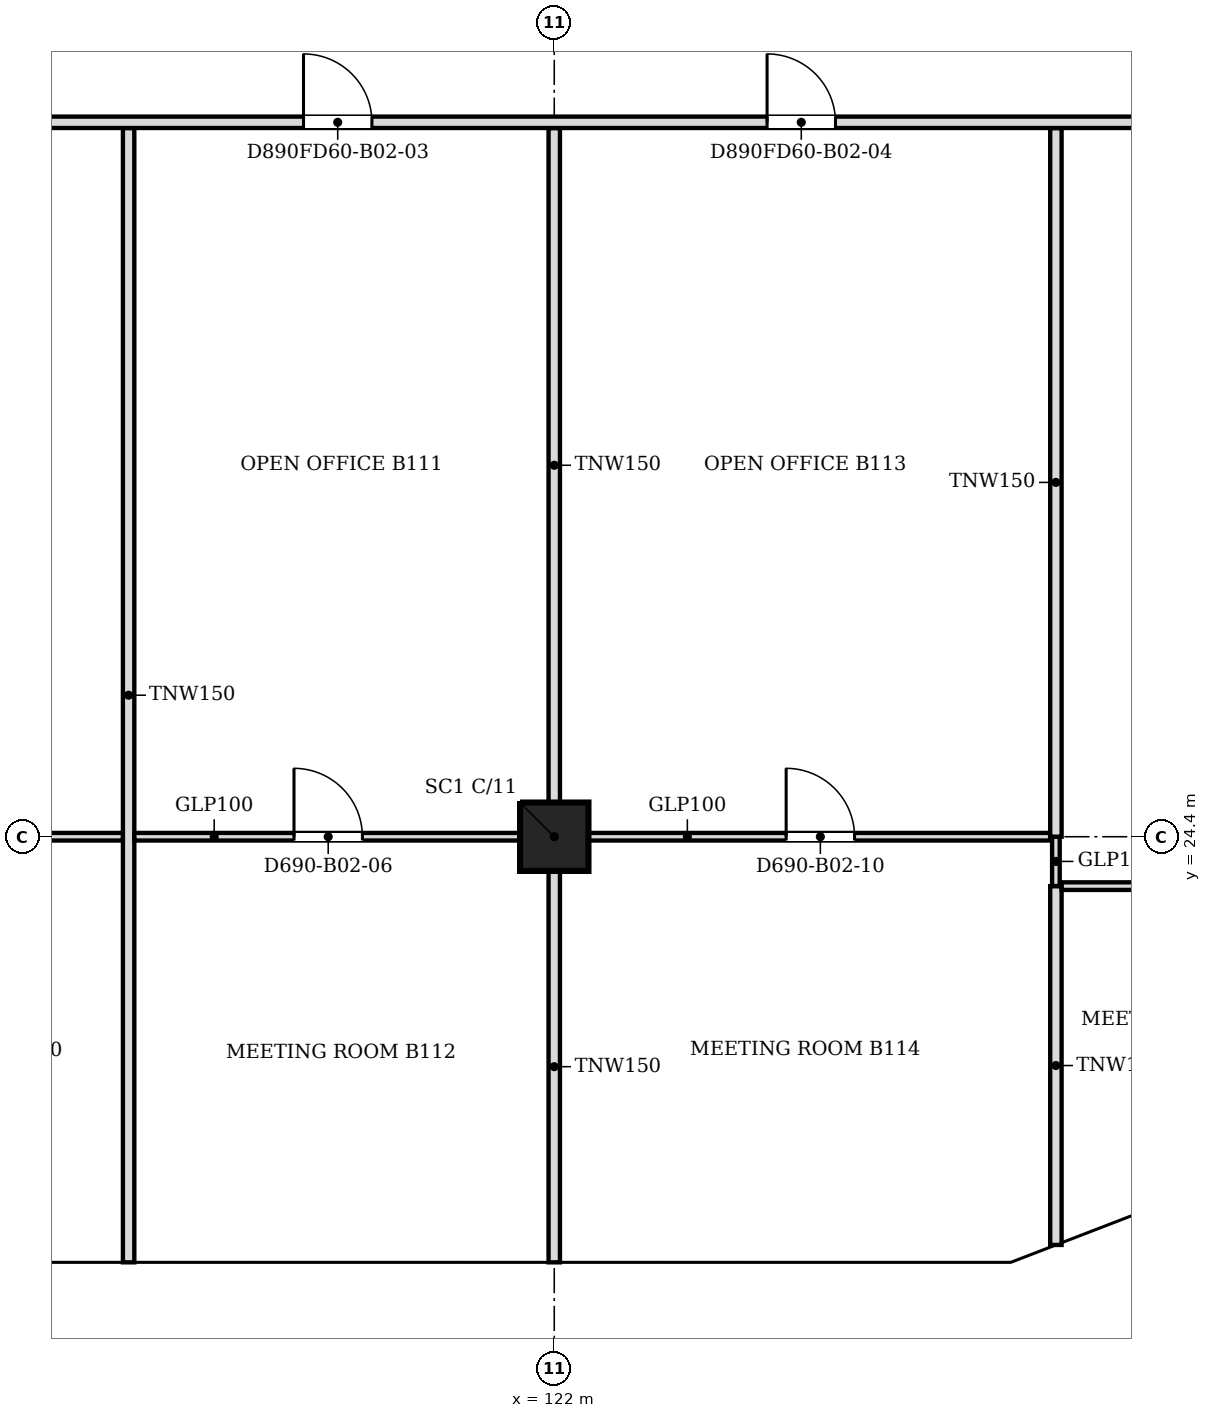
"""IFC4 building model, lengths in metres.
Left out: names, types, materials, properties, quantities, classifications, styles, units other than length and angle.
Written with IfcOpenShell. Run it as: python <this file> out.ifc"""

import sys

from ifc_helpers import new_model, si_unit, direction, frame, frame_2d, origin, origin_2d, place, context, subcontext, project, spatial, polyline, rectangle, outline, extrude, faceted_brep, source, transform, mapped, element, fill, save


model = new_model("IFC4")
c1 = context("Model", 3, precision=1e-05, world=origin(), true_north=direction((0.0, 1.0)))
c2 = subcontext(c1, "Body", "Model", "MODEL_VIEW")
j1 = project(units=[si_unit("LENGTHUNIT", "METRE"), si_unit("PLANEANGLEUNIT", "RADIAN")], contexts=[c1])
p1 = place(None, origin())
s1 = spatial("IfcSite", under=j1, at=p1, CompositionType="ELEMENT")
p2 = place(p1, origin())
s2 = spatial("IfcBuilding", under=s1, at=p2, CompositionType="ELEMENT")
p3 = place(p2, frame((0.0, 0.0, 21.3)))
s3 = spatial("IfcBuildingStorey", under=s2, at=p3, CompositionType="ELEMENT", Elevation=21.3)
p4 = place(p3, frame((122.0, 24.4, 0.0), z_axis=(0.0, 0.0, 1.0), x_axis=(1.0, 0.0, 0.0)))
e1 = element("IfcColumn", 1, at=p4, inside=s3, PredefinedType="COLUMN", context=c2, shape_type="SweptSolid", body=[
    extrude(rectangle(XDim=0.9, YDim=0.9, at=origin_2d()), origin(), (0.0, 0.0, 1.0), 4.3),
])
m1 = source(origin(), c2, "Body", "Brep", [
    faceted_brep([(3.05, -0.25, 0.0), (6.1, -0.25, 4.5), (6.1, -0.25, 4.5), (3.05, -0.25, 9.0), (0.0, -0.25, 4.5), (0.0, 0.25, 4.5), (3.05, 0.25, 9.0), (6.1, 0.25, 4.5), (6.1, 0.25, 4.5), (3.05, 0.25, 0.0)], [[[0, 1, 2, 3, 4]], [[5, 6, 7, 8, 9]], [[9, 8, 1, 0]], [[7, 6, 3, 2]], [[6, 5, 4, 3]], [[5, 9, 0, 4]], [[1, 8, 7, 2]]]),
])
p5 = place(p3, frame((109.8, 18.55, -4.5), z_axis=(0.0, 0.0, 1.0), x_axis=(1.0, 0.0, 0.0)))
e2 = element("IfcWall", 2, at=p5, inside=s3, PredefinedType="SOLIDWALL", context=c2, shape_type="MappedRepresentation", body=[
    mapped(m1, transform((0.0, 0.0, 0.0), scale=1.0)),
])
m2 = source(origin(), c2, "Body", "SweptSolid", [
    extrude(outline(polyline([(3.05, 0.446), (5.798, 4.5), (3.05, 8.554), (0.302, 4.5), (3.05, 0.446)])), frame((0.0, 0.26, 0.0), z_axis=(0.0, -1.0, 0.0), x_axis=(1.0, 0.0, 0.0)), (0.0, 0.0, 1.0), 0.52),
])
p6 = place(p5, origin())
e3 = element("IfcOpeningElement", 3, at=p6, cuts=e2, PredefinedType="OPENING", context=c2, shape_type="MappedRepresentation", body=[
    mapped(m2, transform((0.0, 0.0, 0.0), scale=1.0)),
])
m3 = source(origin(), c2, "Body", "SweptSolid", [
    extrude(outline(polyline([(3.05, 0.0), (6.1, 4.5), (3.05, 9.0), (0.0, 4.5), (3.05, 0.0)])), frame((0.0, 0.25, 0.0), z_axis=(0.0, -1.0, 0.0), x_axis=(1.0, 0.0, 0.0)), (0.0, 0.0, 1.0), 0.5),
])
p7 = place(p3, frame((115.9, 18.55, -4.5), z_axis=(0.0, 0.0, 1.0), x_axis=(1.0, 0.0, 0.0)))
e4 = element("IfcWall", 4, at=p7, inside=s3, PredefinedType="SOLIDWALL", context=c2, shape_type="MappedRepresentation", body=[
    mapped(m3, transform((0.0, 0.0, 0.0), scale=1.0)),
])
p8 = place(p7, origin())
e5 = element("IfcOpeningElement", 5, at=p8, cuts=e4, PredefinedType="OPENING", context=c2, shape_type="MappedRepresentation", body=[
    mapped(m2, transform((0.0, 0.0, 0.0), scale=1.0)),
])
m4 = source(origin(), c2, "Body", "Brep", [
    faceted_brep([(3.05, -0.25, 0.0), (6.053, -0.25, 4.5), (3.05, -0.25, 9.0), (0.0, -0.25, 4.5), (0.0, 0.25, 4.5), (3.05, 0.25, 9.0), (6.007, 0.25, 4.57), (6.007, 0.25, 4.43), (3.05, 0.25, 0.0), (6.053, 0.0, 4.5)], [[[0, 1, 2, 3]], [[4, 5, 6, 7, 8]], [[8, 7, 9, 1, 0]], [[6, 5, 2, 1, 9]], [[5, 4, 3, 2]], [[4, 8, 0, 3]], [[9, 7, 6]]]),
])
p9 = place(p3, frame((122.0, 18.55, -4.5), z_axis=(0.0, 0.0, 1.0), x_axis=(1.0, 0.0, 0.0)))
e6 = element("IfcWall", 6, at=p9, inside=s3, PredefinedType="SOLIDWALL", context=c2, shape_type="MappedRepresentation", body=[
    mapped(m4, transform((0.0, 0.0, 0.0), scale=1.0)),
])
m5 = source(origin(), c2, "Body", "SweptSolid", [
    extrude(outline(polyline([(3.048, 0.448), (5.753, 4.5), (3.048, 8.552), (0.302, 4.5), (3.048, 0.448)])), frame((0.0, 0.26, 0.0), z_axis=(0.0, -1.0, 0.0), x_axis=(1.0, 0.0, 0.0)), (0.0, 0.0, 1.0), 0.52),
])
p10 = place(p9, origin())
e7 = element("IfcOpeningElement", 7, at=p10, cuts=e6, PredefinedType="OPENING", context=c2, shape_type="MappedRepresentation", body=[
    mapped(m5, transform((0.0, 0.0, 0.0), scale=1.0)),
])
m6 = source(origin(), c2, "Body", "Brep", [
    faceted_brep([(2.95, -0.25, 0.0), (3.003, -0.25, 0.081), (3.003, -0.25, 8.919), (2.95, -0.25, 9.0), (0.0, -0.25, 4.5), (0.047, 0.25, 4.571), (2.898, 0.25, 8.919), (2.898, 0.25, 0.081), (0.047, 0.25, 4.429), (2.95, 0.0, 0.0), (2.95, 0.0, 9.0), (0.0, 0.0, 4.5)], [[[0, 1, 2, 3, 4]], [[5, 6, 7, 8]], [[1, 0, 9]], [[10, 3, 2]], [[6, 5, 11, 4, 3, 10]], [[8, 7, 9, 0, 4, 11]], [[8, 11, 5]], [[1, 9, 7, 6, 10, 2]]]),
])
p11 = place(p3, frame((128.053, 18.55, -4.5), z_axis=(0.0, 0.0, 1.0), x_axis=(0.933007896601, 0.359855894603, 0.0)))
e8 = element("IfcWall", 8, at=p11, inside=s3, PredefinedType="SOLIDWALL", context=c2, shape_type="MappedRepresentation", body=[
    mapped(m6, transform((0.0, 0.0, 0.0), scale=1.0)),
])
m7 = source(origin(), c2, "Body", "SweptSolid", [
    extrude(outline(polyline([(2.75, 8.239), (0.299, 4.5), (2.75, 0.761), (2.75, 8.239)])), frame((0.0, 0.26, 0.0), z_axis=(0.0, -1.0, 0.0), x_axis=(1.0, 0.0, 0.0)), (0.0, 0.0, 1.0), 0.52),
])
p12 = place(p11, origin())
e9 = element("IfcOpeningElement", 9, at=p12, cuts=e8, PredefinedType="OPENING", context=c2, shape_type="MappedRepresentation", body=[
    mapped(m7, transform((0.0, 0.0, 0.0), scale=1.0)),
])
m8 = source(origin(), c2, "Body", "Brep", [
    faceted_brep([(3.05, -0.25, 0.0), (6.1, -0.25, 4.5), (6.1, -0.25, 4.5), (0.0, -0.25, 4.5), (0.0, 0.25, 4.5), (6.1, 0.25, 4.5), (6.1, 0.25, 4.5), (3.05, 0.25, 0.0)], [[[0, 1, 2, 3]], [[4, 5, 6, 7]], [[7, 6, 1, 0]], [[5, 4, 3, 2]], [[4, 7, 0, 3]], [[1, 6, 5, 2]]]),
])
p13 = place(p3, frame((112.85, 18.55, 0.0), z_axis=(0.0, 0.0, 1.0), x_axis=(1.0, 0.0, 0.0)))
e10 = element("IfcWall", 10, at=p13, inside=s3, PredefinedType="SOLIDWALL", context=c2, shape_type="MappedRepresentation", body=[
    mapped(m8, transform((0.0, 0.0, 0.0), scale=1.0)),
])
m9 = source(origin(), c2, "Body", "SweptSolid", [
    extrude(outline(polyline([(3.05, 0.446), (5.629, 4.25), (0.471, 4.25), (3.05, 0.446)])), frame((0.0, 0.26, 0.0), z_axis=(0.0, -1.0, 0.0), x_axis=(1.0, 0.0, 0.0)), (0.0, 0.0, 1.0), 0.52),
])
p14 = place(p13, origin())
e11 = element("IfcOpeningElement", 11, at=p14, cuts=e10, PredefinedType="OPENING", context=c2, shape_type="MappedRepresentation", body=[
    mapped(m9, transform((0.0, 0.0, 0.0), scale=1.0)),
])
m10 = source(origin(), c2, "Body", "SweptSolid", [
    extrude(outline(polyline([(3.05, 0.0), (6.1, 4.5), (0.0, 4.5), (3.05, 0.0)])), frame((0.0, 0.25, 0.0), z_axis=(0.0, -1.0, 0.0), x_axis=(1.0, 0.0, 0.0)), (0.0, 0.0, 1.0), 0.5),
])
p15 = place(p3, frame((118.95, 18.55, 0.0), z_axis=(0.0, 0.0, 1.0), x_axis=(1.0, 0.0, 0.0)))
e12 = element("IfcWall", 12, at=p15, inside=s3, PredefinedType="SOLIDWALL", context=c2, shape_type="MappedRepresentation", body=[
    mapped(m10, transform((0.0, 0.0, 0.0), scale=1.0)),
])
p16 = place(p15, origin())
e13 = element("IfcOpeningElement", 13, at=p16, cuts=e12, PredefinedType="OPENING", context=c2, shape_type="MappedRepresentation", body=[
    mapped(m9, transform((0.0, 0.0, 0.0), scale=1.0)),
])
m11 = source(origin(), c2, "Body", "Brep", [
    faceted_brep([(3.003, -0.25, 0.0), (3.05, -0.25, 0.071), (3.05, -0.25, 4.5), (0.0, -0.25, 4.5), (0.0, 0.25, 4.5), (2.957, 0.25, 4.5), (2.957, 0.25, 0.07), (3.003, 0.0, 0.0)], [[[0, 1, 2, 3]], [[4, 5, 6]], [[1, 0, 7]], [[5, 4, 3, 2]], [[4, 6, 7, 0, 3]], [[1, 7, 6, 5, 2]]]),
])
p17 = place(p3, frame((125.05, 18.55, 0.0), z_axis=(0.0, 0.0, 1.0), x_axis=(1.0, 0.0, 0.0)))
e14 = element("IfcWall", 14, at=p17, inside=s3, PredefinedType="SOLIDWALL", context=c2, shape_type="MappedRepresentation", body=[
    mapped(m11, transform((0.0, 0.0, 0.0), scale=1.0)),
])
m12 = source(origin(), c2, "Body", "SweptSolid", [
    extrude(outline(polyline([(2.803, 4.25), (0.468, 4.25), (2.803, 0.75), (2.803, 4.25)])), frame((0.0, 0.26, 0.0), z_axis=(0.0, -1.0, 0.0), x_axis=(1.0, 0.0, 0.0)), (0.0, 0.0, 1.0), 0.52),
])
p18 = place(p17, origin())
e15 = element("IfcOpeningElement", 15, at=p18, cuts=e14, PredefinedType="OPENING", context=c2, shape_type="MappedRepresentation", body=[
    mapped(m12, transform((0.0, 0.0, 0.0), scale=1.0)),
])
m13 = source(origin(), c2, "Body", "Brep", [
    faceted_brep([(0.047, -0.25, 0.0), (2.997, -0.25, 4.5), (0.0, -0.25, 4.5), (0.0, -0.25, 0.07), (0.093, 0.25, 4.5), (2.944, 0.25, 4.5), (2.944, 0.25, 4.419), (0.093, 0.25, 0.071), (2.997, 0.0, 4.5), (0.047, 0.0, 0.0)], [[[0, 1, 2, 3]], [[4, 5, 6, 7]], [[7, 6, 8, 1, 0, 9]], [[5, 4, 2, 1, 8]], [[9, 0, 3]], [[7, 9, 3, 2, 4]], [[6, 5, 8]]]),
])
p19 = place(p3, frame((128.01, 18.533, 0.0), z_axis=(0.0, 0.0, 1.0), x_axis=(0.932990326376, 0.359901446078, 0.0)))
e16 = element("IfcWall", 16, at=p19, inside=s3, PredefinedType="SOLIDWALL", context=c2, shape_type="MappedRepresentation", body=[
    mapped(m13, transform((0.0, 0.0, 0.0), scale=1.0)),
])
m14 = source(origin(), c2, "Body", "SweptSolid", [
    extrude(outline(polyline([(0.247, 0.761), (2.534, 4.25), (0.247, 4.25), (0.247, 0.761)])), frame((0.0, 0.26, 0.0), z_axis=(0.0, -1.0, 0.0), x_axis=(1.0, 0.0, 0.0)), (0.0, 0.0, 1.0), 0.52),
])
p20 = place(p19, origin())
e17 = element("IfcOpeningElement", 17, at=p20, cuts=e16, PredefinedType="OPENING", context=c2, shape_type="MappedRepresentation", body=[
    mapped(m14, transform((0.0, 0.0, 0.0), scale=1.0)),
])
p21 = place(p3, frame((116.4, 18.8, 0.0), z_axis=(0.0, 0.0, 1.0), x_axis=(0.0, 1.0, 0.0)))
e18 = element("IfcWall", 18, at=p21, inside=s3, PredefinedType="PARTITIONING", context=c2, shape_type="SweptSolid", body=[
    extrude(rectangle(XDim=14.924, YDim=0.15, at=frame_2d((7.462, 0.0))), origin(), (0.0, 0.0, 1.0), 3.767),
])
p22 = place(p3, frame((122.0, 18.8, 0.0), z_axis=(0.0, 0.0, 1.0), x_axis=(0.0, 1.0, 0.0)))
e19 = element("IfcWall", 19, at=p22, inside=s3, PredefinedType="PARTITIONING", context=c2, shape_type="SweptSolid", body=[
    extrude(rectangle(XDim=5.149, YDim=0.15, at=frame_2d((2.574, 0.0))), origin(), (0.0, 0.0, 1.0), 3.767),
])
p23 = place(p3, frame((128.6, 19.029, 0.0), z_axis=(0.0, 0.0, 1.0), x_axis=(0.0, 1.0, 0.0)))
e20 = element("IfcWall", 20, at=p23, inside=s3, PredefinedType="PARTITIONING", context=c2, shape_type="SweptSolid", body=[
    extrude(rectangle(XDim=4.721, YDim=0.15, at=frame_2d((2.361, 0.0))), origin(), (0.0, 0.0, 1.0), 3.767),
])
p24 = place(p3, frame((128.6, 23.751, 0.0), z_axis=(0.0, 0.0, 1.0), x_axis=(0.0, 1.0, 0.0)))
e21 = element("IfcWall", 21, at=p24, inside=s3, PredefinedType="PARTITIONING", context=c2, shape_type="SweptSolid", body=[
    extrude(rectangle(XDim=0.648, YDim=0.1, at=frame_2d((0.324, 0.0))), origin(), (0.0, 0.0, 1.0), 3.767),
])
p25 = place(p3, frame((133.413, 23.75, 0.0), z_axis=(0.0, 0.0, 1.0), x_axis=(-1.0, 0.0, 0.0)))
e22 = element("IfcWall", 22, at=p25, inside=s3, PredefinedType="PARTITIONING", context=c2, shape_type="SweptSolid", body=[
    extrude(rectangle(XDim=4.737, YDim=0.1, at=frame_2d((2.369, 0.0))), origin(), (0.0, 0.0, 1.0), 3.767),
])
m15 = source(origin(), c2, "Body", "SweptSolid", [
    extrude(rectangle(XDim=0.9, YDim=2.1, at=frame_2d((0.45, 1.05))), frame((0.0, 0.06, 0.0), z_axis=(0.0, -1.0, 0.0), x_axis=(1.0, 0.0, 0.0)), (0.0, 0.0, 1.0), 0.12),
])
p26 = place(p25, frame((1.937, 0.0, 0.0)))
e23 = element("IfcOpeningElement", 23, at=p26, cuts=e22, PredefinedType="OPENING", context=c2, shape_type="MappedRepresentation", body=[
    mapped(m15, transform((0.0, 0.0, 0.0), scale=1.0)),
])
p27 = place(p3, frame((116.324, 24.4, 0.0), z_axis=(0.0, 0.0, 1.0), x_axis=(-1.0, 0.0, 0.0)))
e24 = element("IfcWall", 24, at=p27, inside=s3, PredefinedType="PARTITIONING", context=c2, shape_type="SweptSolid", body=[
    extrude(rectangle(XDim=4.603, YDim=0.1, at=frame_2d((2.301, 0.0))), origin(), (0.0, 0.0, 1.0), 3.767),
])
p28 = place(p27, frame((1.803, 0.0, 0.0)))
e25 = element("IfcOpeningElement", 25, at=p28, cuts=e24, PredefinedType="OPENING", context=c2, shape_type="MappedRepresentation", body=[
    mapped(m15, transform((0.0, 0.0, 0.0), scale=1.0)),
])
p29 = place(p3, frame((121.549, 24.4, 0.0), z_axis=(0.0, 0.0, 1.0), x_axis=(-1.0, 0.0, 0.0)))
e26 = element("IfcWall", 26, at=p29, inside=s3, PredefinedType="PARTITIONING", context=c2, shape_type="SweptSolid", body=[
    extrude(rectangle(XDim=5.073, YDim=0.1, at=frame_2d((2.537, 0.0))), origin(), (0.0, 0.0, 1.0), 3.767),
])
p30 = place(p29, frame((2.073, 0.0, 0.0)))
e27 = element("IfcOpeningElement", 27, at=p30, cuts=e26, PredefinedType="OPENING", context=c2, shape_type="MappedRepresentation", body=[
    mapped(m15, transform((0.0, 0.0, 0.0), scale=1.0)),
])
p31 = place(p3, frame((128.524, 24.4, 0.0), z_axis=(0.0, 0.0, 1.0), x_axis=(-1.0, 0.0, 0.0)))
e28 = element("IfcWall", 28, at=p31, inside=s3, PredefinedType="PARTITIONING", context=c2, shape_type="SweptSolid", body=[
    extrude(rectangle(XDim=6.073, YDim=0.1, at=frame_2d((3.037, 0.0))), origin(), (0.0, 0.0, 1.0), 3.767),
])
p32 = place(p31, frame((2.573, 0.0, 0.0)))
e29 = element("IfcOpeningElement", 29, at=p32, cuts=e28, PredefinedType="OPENING", context=c2, shape_type="MappedRepresentation", body=[
    mapped(m15, transform((0.0, 0.0, 0.0), scale=1.0)),
])
p33 = place(p3, frame((128.6, 24.4, 0.0), z_axis=(0.0, 0.0, 1.0), x_axis=(0.0, 1.0, 0.0)))
e30 = element("IfcWall", 30, at=p33, inside=s3, PredefinedType="PARTITIONING", context=c2, shape_type="SweptSolid", body=[
    extrude(rectangle(XDim=9.324, YDim=0.15, at=frame_2d((4.662, 0.0))), origin(), (0.0, 0.0, 1.0), 3.767),
])
p34 = place(p3, frame((122.0, 24.851, 0.0), z_axis=(0.0, 0.0, 1.0), x_axis=(0.0, 1.0, 0.0)))
e31 = element("IfcWall", 31, at=p34, inside=s3, PredefinedType="PARTITIONING", context=c2, shape_type="SweptSolid", body=[
    extrude(rectangle(XDim=8.873, YDim=0.15, at=frame_2d((4.437, 0.0))), origin(), (0.0, 0.0, 1.0), 3.767),
])
p35 = place(p3, frame((133.7, 33.8, 0.0), z_axis=(0.0, 0.0, 1.0), x_axis=(-1.0, 0.0, 0.0)))
e32 = element("IfcWall", 32, at=p35, inside=s3, PredefinedType="PARTITIONING", context=c2, shape_type="SweptSolid", body=[
    extrude(rectangle(XDim=47.8, YDim=0.15, at=frame_2d((23.9, 0.0))), origin(), (0.0, 0.0, 1.0), 3.767),
])
m16 = source(origin(), c2, "Body", "SweptSolid", [
    extrude(rectangle(XDim=0.9, YDim=2.1, at=frame_2d((0.45, 1.05))), frame((0.0, 0.085, 0.0), z_axis=(0.0, -1.0, 0.0), x_axis=(1.0, 0.0, 0.0)), (0.0, 0.0, 1.0), 0.17),
])
p36 = place(p35, frame((2.099, 0.0, 0.0)))
e33 = element("IfcOpeningElement", 33, at=p36, cuts=e32, PredefinedType="OPENING", context=c2, shape_type="MappedRepresentation", body=[
    mapped(m16, transform((0.0, 0.0, 0.0), scale=1.0)),
])
p37 = place(p35, frame((14.099, 0.0, 0.0)))
e34 = element("IfcOpeningElement", 34, at=p37, cuts=e32, PredefinedType="OPENING", context=c2, shape_type="MappedRepresentation", body=[
    mapped(m16, transform((0.0, 0.0, 0.0), scale=1.0)),
])
p38 = place(p35, frame((8.0, 0.0, 0.0)))
e35 = element("IfcOpeningElement", 35, at=p38, cuts=e32, PredefinedType="OPENING", context=c2, shape_type="MappedRepresentation", body=[
    mapped(m16, transform((0.0, 0.0, 0.0), scale=1.0)),
])
p39 = place(p35, frame((21.449, 0.0, 0.0)))
e36 = element("IfcOpeningElement", 36, at=p39, cuts=e32, PredefinedType="OPENING", context=c2, shape_type="MappedRepresentation", body=[
    mapped(m16, transform((0.0, 0.0, 0.0), scale=1.0)),
])
p40 = place(p35, frame((30.799, 0.0, 0.0)))
e37 = element("IfcOpeningElement", 37, at=p40, cuts=e32, PredefinedType="OPENING", context=c2, shape_type="MappedRepresentation", body=[
    mapped(m16, transform((0.0, 0.0, 0.0), scale=1.0)),
])
p41 = place(p35, frame((41.5, 0.0, 0.0)))
e38 = element("IfcOpeningElement", 38, at=p41, cuts=e32, PredefinedType="OPENING", context=c2, shape_type="MappedRepresentation", body=[
    mapped(m16, transform((0.0, 0.0, 0.0), scale=1.0)),
])
m17 = source(origin(), c2, "Body", "SweptSolid", [
    extrude(rectangle(XDim=0.9, YDim=2.1, at=frame_2d((0.45, 1.05))), frame((0.0, 0.025, 0.0), z_axis=(0.0, -1.0, 0.0), x_axis=(1.0, 0.0, 0.0)), (0.0, 0.0, 1.0), 0.05),
])
p42 = place(p30, origin())
e39 = element("IfcDoor", 39, at=p42, inside=s3, OperationType="SINGLE_SWING_RIGHT", PredefinedType="DOOR", context=c2, shape_type="MappedRepresentation", body=[
    mapped(m17, transform((0.0, 0.0, 0.0), scale=1.0)),
])
fill(e27, e39)
p43 = place(p37, origin())
e40 = element("IfcDoor", 40, at=p43, inside=s3, OperationType="SINGLE_SWING_RIGHT", PredefinedType="DOOR", context=c2, shape_type="MappedRepresentation", body=[
    mapped(m17, transform((0.0, 0.0, 0.0), scale=1.0)),
])
fill(e34, e40)
p44 = place(p32, origin())
e41 = element("IfcDoor", 41, at=p44, inside=s3, OperationType="SINGLE_SWING_RIGHT", PredefinedType="DOOR", context=c2, shape_type="MappedRepresentation", body=[
    mapped(m17, transform((0.0, 0.0, 0.0), scale=1.0)),
])
fill(e29, e41)
p45 = place(p38, origin())
e42 = element("IfcDoor", 42, at=p45, inside=s3, OperationType="SINGLE_SWING_RIGHT", PredefinedType="DOOR", context=c2, shape_type="MappedRepresentation", body=[
    mapped(m17, transform((0.0, 0.0, 0.0), scale=1.0)),
])
fill(e35, e42)
save(model, sys.argv[1])
